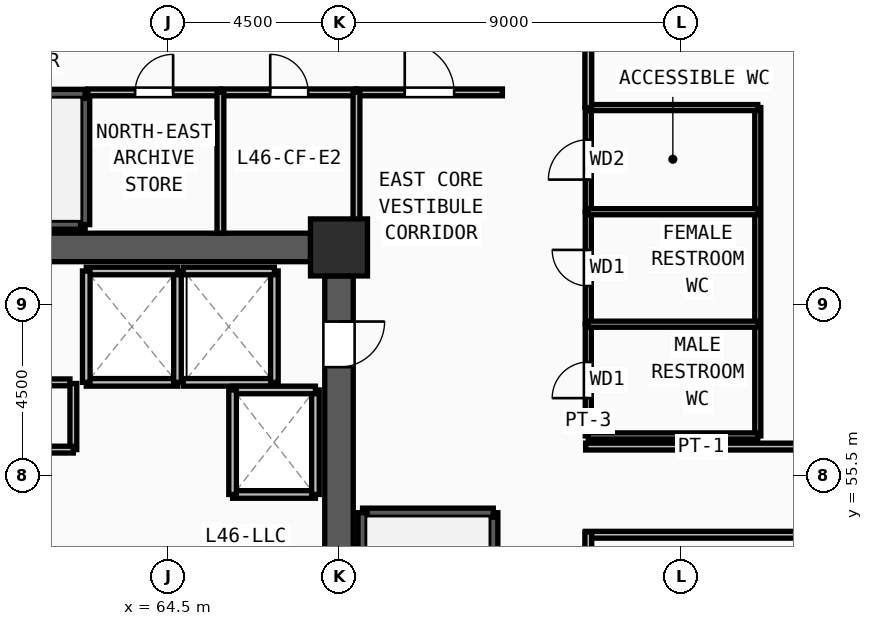
"""IFC4 building model, lengths in metres.
Left out: names, types, materials, properties, quantities, classifications, styles, units other than length and angle.
Written with IfcOpenShell. Run it as: python <this file> out.ifc"""

import sys

from ifc_helpers import new_model, si_unit, direction, frame, frame_2d, origin, origin_2d, place, context, subcontext, project, spatial, rectangle, extrude, source, transform, mapped, element, fill, save


model = new_model("IFC4")
c1 = context("Model", 3, precision=1e-05, world=origin(), true_north=direction((0.0, 1.0)))
c2 = subcontext(c1, "Body", "Model", "MODEL_VIEW")
j1 = project(units=[si_unit("LENGTHUNIT", "METRE"), si_unit("PLANEANGLEUNIT", "RADIAN")], contexts=[c1])
p1 = place(None, origin())
s1 = spatial("IfcSite", under=j1, at=p1, CompositionType="ELEMENT")
p2 = place(p1, origin())
s2 = spatial("IfcBuilding", under=s1, at=p2, CompositionType="ELEMENT")
p3 = place(p2, frame((0.0, 0.0, 177.75)))
s3 = spatial("IfcBuildingStorey", under=s2, at=p3, CompositionType="ELEMENT", Elevation=177.75)
m1 = source(origin(), c2, "Body", "SweptSolid", [
    extrude(rectangle(XDim=1.5, YDim=1.5, at=origin_2d()), origin(), (0.0, 0.0, 1.0), 3.75),
])
p4 = place(p3, frame((69.0, 61.5, 0.0), z_axis=(0.0, 0.0, 1.0), x_axis=(1.0, 0.0, 0.0)))
e1 = element("IfcColumn", 1, at=p4, inside=s3, PredefinedType="COLUMN", context=c2, shape_type="MappedRepresentation", body=[
    mapped(m1, transform((0.0, 0.0, 0.0), x_axis=(1.0, 0.0, 0.0), y_axis=(0.0, 1.0, 0.0), z_axis=(0.0, 0.0, 1.0), scale=1.0)),
])
p5 = place(p3, frame((60.75, 61.5, 0.0), z_axis=(0.0, 0.0, 1.0), x_axis=(1.0, 0.0, 0.0)))
e2 = element("IfcWall", 2, at=p5, inside=s3, PredefinedType="SHEAR", context=c2, shape_type="SweptSolid", body=[
    extrude(rectangle(XDim=7.5, YDim=0.75, at=frame_2d((3.75, 0.0))), origin(), (0.0, 0.0, 1.0), 3.57),
])
p6 = place(p3, frame((69.0, 60.75, 0.0), z_axis=(0.0, 0.0, 1.0), x_axis=(0.0, -1.0, 0.0)))
e3 = element("IfcWall", 3, at=p6, inside=s3, PredefinedType="SHEAR", context=c2, shape_type="SweptSolid", body=[
    extrude(rectangle(XDim=13.5, YDim=0.75, at=frame_2d((6.75, 0.0))), origin(), (0.0, 0.0, 1.0), 3.57),
])
m2 = source(origin(), c2, "Body", "SweptSolid", [
    extrude(rectangle(XDim=1.2, YDim=2.2, at=frame_2d((0.6, 1.1))), frame((0.0, 0.385, 0.0), z_axis=(0.0, -1.0, 0.0), x_axis=(1.0, 0.0, 0.0)), (0.0, 0.0, 1.0), 0.77),
])
p7 = place(p6, frame((1.2, 0.0, 0.0)))
e4 = element("IfcOpeningElement", 4, at=p7, cuts=e3, PredefinedType="OPENING", context=c2, shape_type="MappedRepresentation", body=[
    mapped(m2, transform((0.0, 0.0, 0.0), x_axis=(1.0, 0.0, 0.0), y_axis=(0.0, 1.0, 0.0), z_axis=(0.0, 0.0, 1.0), scale=1.0)),
])
p8 = place(p3, frame((73.06, 46.7, 0.0), z_axis=(0.0, 0.0, 1.0), x_axis=(0.0, 1.0, 0.0)))
e5 = element("IfcWall", 5, at=p8, inside=s3, PredefinedType="SOLIDWALL", context=c2, shape_type="SweptSolid", body=[
    extrude(rectangle(XDim=7.82, YDim=0.24, at=frame_2d((3.91, 0.0))), origin(), (0.0, 0.0, 1.0), 3.57),
])
m3 = source(origin(), c2, "Body", "SweptSolid", [
    extrude(rectangle(XDim=1.2, YDim=2.2, at=frame_2d((0.6, 1.1))), frame((0.0, 0.13, 0.0), z_axis=(0.0, -1.0, 0.0), x_axis=(1.0, 0.0, 0.0)), (0.0, 0.0, 1.0), 0.26),
])
p9 = place(p8, frame((0.32, 0.0, 0.0)))
e6 = element("IfcOpeningElement", 6, at=p9, cuts=e5, PredefinedType="OPENING", context=c2, shape_type="MappedRepresentation", body=[
    mapped(m3, transform((0.0, 0.0, 0.0), x_axis=(1.0, 0.0, 0.0), y_axis=(0.0, 1.0, 0.0), z_axis=(0.0, 0.0, 1.0), scale=1.0)),
])
p10 = place(p3, frame((73.06, 54.52, 0.0), z_axis=(0.0, 0.0, 1.0), x_axis=(-1.0, 0.0, 0.0)))
e7 = element("IfcWall", 7, at=p10, inside=s3, PredefinedType="SOLIDWALL", context=c2, shape_type="SweptSolid", body=[
    extrude(rectangle(XDim=3.44, YDim=0.24, at=frame_2d((1.72, 0.0))), origin(), (0.0, 0.0, 1.0), 3.57),
])
for number, where, z_axis, x_axis in (
    (8, (69.62, 54.52, 0.0), (0.0, 0.0, 1.0), (0.0, -1.0, 0.0)),
    (9, (54.5, 62.1, 0.0), (0.0, 0.0, 1.0), (1.0, 0.0, 0.0)),
):
    element("IfcWall", number, at=place(p3, frame(where, z_axis=z_axis, x_axis=x_axis)), inside=s3, PredefinedType="SOLIDWALL", context=c2, shape_type="SweptSolid", body=[
        extrude(rectangle(XDim=7.82, YDim=0.24, at=frame_2d((3.91, 0.0))), origin(), (0.0, 0.0, 1.0), 3.57),
    ])
p11 = place(p3, frame((62.32, 62.1, 0.0), z_axis=(0.0, 0.0, 1.0), x_axis=(0.0, 1.0, 0.0)))
e10 = element("IfcWall", 10, at=p11, inside=s3, PredefinedType="SOLIDWALL", context=c2, shape_type="SweptSolid", body=[
    extrude(rectangle(XDim=3.44, YDim=0.24, at=frame_2d((1.72, 0.0))), origin(), (0.0, 0.0, 1.0), 3.57),
])
p12 = place(p3, frame((62.32, 65.54, 0.0), z_axis=(0.0, 0.0, 1.0), x_axis=(-1.0, 0.0, 0.0)))
e11 = element("IfcWall", 11, at=p12, inside=s3, PredefinedType="SOLIDWALL", context=c2, shape_type="SweptSolid", body=[
    extrude(rectangle(XDim=7.82, YDim=0.24, at=frame_2d((3.91, 0.0))), origin(), (0.0, 0.0, 1.0), 3.57),
])
p13 = place(p12, frame((6.3, 0.0, 0.0)))
e12 = element("IfcOpeningElement", 12, at=p13, cuts=e11, PredefinedType="OPENING", context=c2, shape_type="MappedRepresentation", body=[
    mapped(m3, transform((0.0, 0.0, 0.0), x_axis=(1.0, 0.0, 0.0), y_axis=(0.0, 1.0, 0.0), z_axis=(0.0, 0.0, 1.0), scale=1.0)),
])
p14 = place(p3, frame((62.35, 57.95, 0.0), z_axis=(0.0, 0.0, 1.0), x_axis=(1.0, 0.0, 0.0)))
e13 = element("IfcWall", 13, at=p14, inside=s3, PredefinedType="SOLIDWALL", context=c2, shape_type="SweptSolid", body=[
    extrude(rectangle(XDim=2.4, YDim=0.2, at=frame_2d((1.2, 0.0))), origin(), (0.0, 0.0, 1.0), 3.57),
])
p15 = place(p3, frame((64.75, 57.95, 0.0), z_axis=(0.0, 0.0, 1.0), x_axis=(0.0, 1.0, 0.0)))
e14 = element("IfcWall", 14, at=p15, inside=s3, PredefinedType="SOLIDWALL", context=c2, shape_type="SweptSolid", body=[
    extrude(rectangle(XDim=2.93, YDim=0.2, at=frame_2d((1.465, 0.0))), origin(), (0.0, 0.0, 1.0), 3.57),
])
p16 = place(p3, frame((64.75, 60.88, 0.0), z_axis=(0.0, 0.0, 1.0), x_axis=(-1.0, 0.0, 0.0)))
e15 = element("IfcWall", 15, at=p16, inside=s3, PredefinedType="SOLIDWALL", context=c2, shape_type="SweptSolid", body=[
    extrude(rectangle(XDim=2.4, YDim=0.2, at=frame_2d((1.2, 0.0))), origin(), (0.0, 0.0, 1.0), 3.57),
])
p17 = place(p3, frame((62.35, 60.88, 0.0), z_axis=(0.0, 0.0, 1.0), x_axis=(0.0, -1.0, 0.0)))
e16 = element("IfcWall", 16, at=p17, inside=s3, PredefinedType="SOLIDWALL", context=c2, shape_type="SweptSolid", body=[
    extrude(rectangle(XDim=2.93, YDim=0.2, at=frame_2d((1.465, 0.0))), origin(), (0.0, 0.0, 1.0), 3.57),
])
p18 = place(p3, frame((64.9, 57.95, 0.0), z_axis=(0.0, 0.0, 1.0), x_axis=(1.0, 0.0, 0.0)))
e17 = element("IfcWall", 17, at=p18, inside=s3, PredefinedType="SOLIDWALL", context=c2, shape_type="SweptSolid", body=[
    extrude(rectangle(XDim=2.4, YDim=0.2, at=frame_2d((1.2, 0.0))), origin(), (0.0, 0.0, 1.0), 3.57),
])
p19 = place(p3, frame((67.3, 57.95, 0.0), z_axis=(0.0, 0.0, 1.0), x_axis=(0.0, 1.0, 0.0)))
e18 = element("IfcWall", 18, at=p19, inside=s3, PredefinedType="SOLIDWALL", context=c2, shape_type="SweptSolid", body=[
    extrude(rectangle(XDim=2.93, YDim=0.2, at=frame_2d((1.465, 0.0))), origin(), (0.0, 0.0, 1.0), 3.57),
])
p20 = place(p3, frame((67.3, 60.88, 0.0), z_axis=(0.0, 0.0, 1.0), x_axis=(-1.0, 0.0, 0.0)))
e19 = element("IfcWall", 19, at=p20, inside=s3, PredefinedType="SOLIDWALL", context=c2, shape_type="SweptSolid", body=[
    extrude(rectangle(XDim=2.4, YDim=0.2, at=frame_2d((1.2, 0.0))), origin(), (0.0, 0.0, 1.0), 3.57),
])
p21 = place(p3, frame((66.2, 55.0, 0.0), z_axis=(0.0, 0.0, 1.0), x_axis=(1.0, 0.0, 0.0)))
e20 = element("IfcWall", 20, at=p21, inside=s3, PredefinedType="SOLIDWALL", context=c2, shape_type="SweptSolid", body=[
    extrude(rectangle(XDim=2.18, YDim=0.2, at=frame_2d((1.09, 0.0))), origin(), (0.0, 0.0, 1.0), 3.57),
])
p22 = place(p3, frame((68.38, 55.0, 0.0), z_axis=(0.0, 0.0, 1.0), x_axis=(0.0, 1.0, 0.0)))
e21 = element("IfcWall", 21, at=p22, inside=s3, PredefinedType="SOLIDWALL", context=c2, shape_type="SweptSolid", body=[
    extrude(rectangle(XDim=2.75, YDim=0.2, at=frame_2d((1.375, 0.0))), origin(), (0.0, 0.0, 1.0), 3.57),
])
p23 = place(p3, frame((68.38, 57.75, 0.0), z_axis=(0.0, 0.0, 1.0), x_axis=(-1.0, 0.0, 0.0)))
e22 = element("IfcWall", 22, at=p23, inside=s3, PredefinedType="SOLIDWALL", context=c2, shape_type="SweptSolid", body=[
    extrude(rectangle(XDim=2.18, YDim=0.2, at=frame_2d((1.09, 0.0))), origin(), (0.0, 0.0, 1.0), 3.57),
])
p24 = place(p3, frame((66.2, 57.75, 0.0), z_axis=(0.0, 0.0, 1.0), x_axis=(0.0, -1.0, 0.0)))
e23 = element("IfcWall", 23, at=p24, inside=s3, PredefinedType="SOLIDWALL", context=c2, shape_type="SweptSolid", body=[
    extrude(rectangle(XDim=2.75, YDim=0.2, at=frame_2d((1.375, 0.0))), origin(), (0.0, 0.0, 1.0), 3.57),
])
p25 = place(p3, frame((59.81, 57.95, 0.0), z_axis=(0.0, 0.0, 1.0), x_axis=(1.0, 0.0, 0.0)))
e24 = element("IfcWall", 24, at=p25, inside=s3, PredefinedType="PARTITIONING", context=c2, shape_type="SweptSolid", body=[
    extrude(rectangle(XDim=2.11, YDim=0.18, at=frame_2d((1.055, 0.0))), origin(), (0.0, 0.0, 1.0), 3.57),
])
m4 = source(origin(), c2, "Body", "SweptSolid", [
    extrude(rectangle(XDim=0.85, YDim=2.1, at=frame_2d((0.425, 1.05))), frame((0.0, 0.1, 0.0), z_axis=(0.0, -1.0, 0.0), x_axis=(1.0, 0.0, 0.0)), (0.0, 0.0, 1.0), 0.2),
])
p26 = place(p25, frame((0.635, 0.0, 0.0)))
e25 = element("IfcOpeningElement", 25, at=p26, cuts=e24, PredefinedType="OPENING", context=c2, shape_type="MappedRepresentation", body=[
    mapped(m4, transform((0.0, 0.0, 0.0), x_axis=(1.0, 0.0, 0.0), y_axis=(0.0, 1.0, 0.0), z_axis=(0.0, 0.0, 1.0), scale=1.0)),
])
p27 = place(p3, frame((75.56, 56.54, 0.0), z_axis=(0.0, 0.0, 1.0), x_axis=(0.0, 1.0, 0.0)))
e26 = element("IfcWall", 26, at=p27, inside=s3, PredefinedType="PARTITIONING", context=c2, shape_type="SweptSolid", body=[
    extrude(rectangle(XDim=2.94, YDim=0.16, at=frame_2d((1.47, 0.0))), origin(), (0.0, 0.0, 1.0), 3.57),
])
m5 = source(origin(), c2, "Body", "SweptSolid", [
    extrude(rectangle(XDim=0.95, YDim=2.15, at=frame_2d((0.475, 1.075))), frame((0.0, 0.09, 0.0), z_axis=(0.0, -1.0, 0.0), x_axis=(1.0, 0.0, 0.0)), (0.0, 0.0, 1.0), 0.18),
])
p28 = place(p27, frame((0.995, 0.0, 0.0)))
e27 = element("IfcOpeningElement", 27, at=p28, cuts=e26, PredefinedType="OPENING", context=c2, shape_type="MappedRepresentation", body=[
    mapped(m5, transform((0.0, 0.0, 0.0), x_axis=(1.0, 0.0, 0.0), y_axis=(0.0, 1.0, 0.0), z_axis=(0.0, 0.0, 1.0), scale=1.0)),
])
p29 = place(p3, frame((75.56, 59.48, 0.0), z_axis=(0.0, 0.0, 1.0), x_axis=(0.0, 1.0, 0.0)))
e28 = element("IfcWall", 28, at=p29, inside=s3, PredefinedType="PARTITIONING", context=c2, shape_type="SweptSolid", body=[
    extrude(rectangle(XDim=2.96, YDim=0.16, at=frame_2d((1.48, 0.0))), origin(), (0.0, 0.0, 1.0), 3.57),
])
p30 = place(p29, frame((1.005, 0.0, 0.0)))
e29 = element("IfcOpeningElement", 29, at=p30, cuts=e28, PredefinedType="OPENING", context=c2, shape_type="MappedRepresentation", body=[
    mapped(m5, transform((0.0, 0.0, 0.0), x_axis=(1.0, 0.0, 0.0), y_axis=(0.0, 1.0, 0.0), z_axis=(0.0, 0.0, 1.0), scale=1.0)),
])
p31 = place(p3, frame((75.56, 62.44, 0.0), z_axis=(0.0, 0.0, 1.0), x_axis=(0.0, 1.0, 0.0)))
e30 = element("IfcWall", 30, at=p31, inside=s3, PredefinedType="PARTITIONING", context=c2, shape_type="SweptSolid", body=[
    extrude(rectangle(XDim=2.74, YDim=0.16, at=frame_2d((1.37, 0.0))), origin(), (0.0, 0.0, 1.0), 3.57),
])
m6 = source(origin(), c2, "Body", "SweptSolid", [
    extrude(rectangle(XDim=1.05, YDim=2.15, at=frame_2d((0.525, 1.075))), frame((0.0, 0.09, 0.0), z_axis=(0.0, -1.0, 0.0), x_axis=(1.0, 0.0, 0.0)), (0.0, 0.0, 1.0), 0.18),
])
p32 = place(p31, frame((0.845, 0.0, 0.0)))
e31 = element("IfcOpeningElement", 31, at=p32, cuts=e30, PredefinedType="OPENING", context=c2, shape_type="MappedRepresentation", body=[
    mapped(m6, transform((0.0, 0.0, 0.0), x_axis=(1.0, 0.0, 0.0), y_axis=(0.0, 1.0, 0.0), z_axis=(0.0, 0.0, 1.0), scale=1.0)),
])
p33 = place(p3, frame((62.39, 65.58, 0.0), z_axis=(0.0, 0.0, 1.0), x_axis=(1.0, 0.0, 0.0)))
e32 = element("IfcWall", 32, at=p33, inside=s3, PredefinedType="PARTITIONING", context=c2, shape_type="SweptSolid", body=[
    extrude(rectangle(XDim=3.49, YDim=0.18, at=frame_2d((1.745, 0.0))), origin(), (0.0, 0.0, 1.0), 3.57),
])
m7 = source(origin(), c2, "Body", "SweptSolid", [
    extrude(rectangle(XDim=1.0, YDim=2.2, at=frame_2d((0.5, 1.1))), frame((0.0, 0.1, 0.0), z_axis=(0.0, -1.0, 0.0), x_axis=(1.0, 0.0, 0.0)), (0.0, 0.0, 1.0), 0.2),
])
p34 = place(p33, frame((1.245, 0.0, 0.0)))
e33 = element("IfcOpeningElement", 33, at=p34, cuts=e32, PredefinedType="OPENING", context=c2, shape_type="MappedRepresentation", body=[
    mapped(m7, transform((0.0, 0.0, 0.0), x_axis=(1.0, 0.0, 0.0), y_axis=(0.0, 1.0, 0.0), z_axis=(0.0, 0.0, 1.0), scale=1.0)),
])
p35 = place(p3, frame((65.92, 65.58, 0.0), z_axis=(0.0, 0.0, 1.0), x_axis=(1.0, 0.0, 0.0)))
e34 = element("IfcWall", 34, at=p35, inside=s3, PredefinedType="PARTITIONING", context=c2, shape_type="SweptSolid", body=[
    extrude(rectangle(XDim=3.54, YDim=0.18, at=frame_2d((1.77, 0.0))), origin(), (0.0, 0.0, 1.0), 3.57),
])
p36 = place(p35, frame((1.27, 0.0, 0.0)))
e35 = element("IfcOpeningElement", 35, at=p36, cuts=e34, PredefinedType="OPENING", context=c2, shape_type="MappedRepresentation", body=[
    mapped(m7, transform((0.0, 0.0, 0.0), x_axis=(1.0, 0.0, 0.0), y_axis=(0.0, 1.0, 0.0), z_axis=(0.0, 0.0, 1.0), scale=1.0)),
])
p37 = place(p3, frame((69.46, 65.58, 0.0), z_axis=(0.0, 0.0, 1.0), x_axis=(1.0, 0.0, 0.0)))
e36 = element("IfcWall", 36, at=p37, inside=s3, PredefinedType="PARTITIONING", context=c2, shape_type="SweptSolid", body=[
    extrude(rectangle(XDim=3.84, YDim=0.18, at=frame_2d((1.92, 0.0))), origin(), (0.0, 0.0, 1.0), 3.57),
])
m8 = source(origin(), c2, "Body", "SweptSolid", [
    extrude(rectangle(XDim=1.3, YDim=2.2, at=frame_2d((0.65, 1.1))), frame((0.0, 0.1, 0.0), z_axis=(0.0, -1.0, 0.0), x_axis=(1.0, 0.0, 0.0)), (0.0, 0.0, 1.0), 0.2),
])
p38 = place(p37, frame((1.27, 0.0, 0.0)))
e37 = element("IfcOpeningElement", 37, at=p38, cuts=e36, PredefinedType="OPENING", context=c2, shape_type="MappedRepresentation", body=[
    mapped(m8, transform((0.0, 0.0, 0.0), x_axis=(1.0, 0.0, 0.0), y_axis=(0.0, 1.0, 0.0), z_axis=(0.0, 0.0, 1.0), scale=1.0)),
])
p39 = place(p3, frame((75.49, 56.26, 0.0), z_axis=(0.0, 0.0, 1.0), x_axis=(1.0, 0.0, 0.0)))
e38 = element("IfcWall", 38, at=p39, inside=s3, PredefinedType="PARTITIONING", context=c2, shape_type="SweptSolid", body=[
    extrude(rectangle(XDim=14.15, YDim=0.18, at=frame_2d((7.075, 0.0))), origin(), (0.0, 0.0, 1.0), 3.57),
])
m9 = source(origin(), c2, "Body", "SweptSolid", [
    extrude(rectangle(XDim=1.5, YDim=2.2, at=frame_2d((0.75, 1.1))), frame((0.0, 0.1, 0.0), z_axis=(0.0, -1.0, 0.0), x_axis=(1.0, 0.0, 0.0)), (0.0, 0.0, 1.0), 0.2),
])
p40 = place(p39, frame((6.325, 0.0, 0.0)))
e39 = element("IfcOpeningElement", 39, at=p40, cuts=e38, PredefinedType="OPENING", context=c2, shape_type="MappedRepresentation", body=[
    mapped(m9, transform((0.0, 0.0, 0.0), x_axis=(1.0, 0.0, 0.0), y_axis=(0.0, 1.0, 0.0), z_axis=(0.0, 0.0, 1.0), scale=1.0)),
])
p41 = place(p3, frame((88.517, 53.94, 0.0), z_axis=(0.0, 0.0, 1.0), x_axis=(-1.0, 0.0, 0.0)))
e40 = element("IfcWall", 40, at=p41, inside=s3, PredefinedType="PARTITIONING", context=c2, shape_type="SweptSolid", body=[
    extrude(rectangle(XDim=13.027, YDim=0.18, at=frame_2d((6.514, 0.0))), origin(), (0.0, 0.0, 1.0), 3.57),
])
p42 = place(p41, frame((6.014, 0.0, 0.0)))
e41 = element("IfcOpeningElement", 41, at=p42, cuts=e40, PredefinedType="OPENING", context=c2, shape_type="MappedRepresentation", body=[
    mapped(m7, transform((0.0, 0.0, 0.0), x_axis=(1.0, 0.0, 0.0), y_axis=(0.0, 1.0, 0.0), z_axis=(0.0, 0.0, 1.0), scale=1.0)),
])
p43 = place(p3, frame((62.01, 56.18, 0.0), z_axis=(0.0, 0.0, 1.0), x_axis=(0.0, 1.0, 0.0)))
e42 = element("IfcWall", 42, at=p43, inside=s3, PredefinedType="PARTITIONING", context=c2, shape_type="SweptSolid", body=[
    extrude(rectangle(XDim=1.74, YDim=0.18, at=frame_2d((0.87, 0.0))), origin(), (0.0, 0.0, 1.0), 3.57),
])
p44 = place(p3, frame((59.72, 56.18, 0.0), z_axis=(0.0, 0.0, 1.0), x_axis=(1.0, 0.0, 0.0)))
e43 = element("IfcWall", 43, at=p44, inside=s3, PredefinedType="PARTITIONING", context=c2, shape_type="SweptSolid", body=[
    extrude(rectangle(XDim=2.29, YDim=0.18, at=frame_2d((1.145, 0.0))), origin(), (0.0, 0.0, 1.0), 3.57),
])
p45 = place(p3, frame((80.02, 56.54, 0.0), z_axis=(0.0, 0.0, 1.0), x_axis=(0.0, 1.0, 0.0)))
e44 = element("IfcWall", 44, at=p45, inside=s3, PredefinedType="PARTITIONING", context=c2, shape_type="SweptSolid", body=[
    extrude(rectangle(XDim=8.64, YDim=0.16, at=frame_2d((4.32, 0.0))), origin(), (0.0, 0.0, 1.0), 3.57),
])
for number, where, z_axis, x_axis in (
    (45, (75.56, 56.54, 0.0), (0.0, 0.0, 1.0), (1.0, 0.0, 0.0)),
    (46, (75.56, 59.48, 0.0), (0.0, 0.0, 1.0), (1.0, 0.0, 0.0)),
    (47, (75.56, 62.44, 0.0), (0.0, 0.0, 1.0), (1.0, 0.0, 0.0)),
    (48, (75.56, 65.18, 0.0), (0.0, 0.0, 1.0), (1.0, 0.0, 0.0)),
):
    element("IfcWall", number, at=place(p3, frame(where, z_axis=z_axis, x_axis=x_axis)), inside=s3, PredefinedType="PARTITIONING", context=c2, shape_type="SweptSolid", body=[
        extrude(rectangle(XDim=4.46, YDim=0.16, at=frame_2d((2.23, 0.0))), origin(), (0.0, 0.0, 1.0), 3.57),
    ])
p46 = place(p3, frame((65.88, 61.875, 0.0), z_axis=(0.0, 0.0, 1.0), x_axis=(0.0, 1.0, 0.0)))
e49 = element("IfcWall", 49, at=p46, inside=s3, PredefinedType="PARTITIONING", context=c2, shape_type="SweptSolid", body=[
    extrude(rectangle(XDim=3.705, YDim=0.18, at=frame_2d((1.853, 0.0))), origin(), (0.0, 0.0, 1.0), 3.57),
])
p47 = place(p3, frame((69.46, 61.95, 0.0), z_axis=(0.0, 0.0, 1.0), x_axis=(0.0, 1.0, 0.0)))
e50 = element("IfcWall", 50, at=p47, inside=s3, PredefinedType="PARTITIONING", context=c2, shape_type="SweptSolid", body=[
    extrude(rectangle(XDim=3.63, YDim=0.18, at=frame_2d((1.815, 0.0))), origin(), (0.0, 0.0, 1.0), 3.57),
])
p48 = place(p3, frame((75.56, 67.215, 0.0), z_axis=(0.0, 0.0, 1.0), x_axis=(0.0, -1.0, 0.0)))
e51 = element("IfcWall", 51, at=p48, inside=s3, PredefinedType="PARTITIONING", context=c2, shape_type="SweptSolid", body=[
    extrude(rectangle(XDim=2.035, YDim=0.18, at=frame_2d((1.018, 0.0))), origin(), (0.0, 0.0, 1.0), 3.57),
])
p49 = place(p3, frame((75.56, 54.01, 0.0), z_axis=(0.0, 0.0, 1.0), x_axis=(0.0, -1.0, 0.0)))
e52 = element("IfcWall", 52, at=p49, inside=s3, PredefinedType="PARTITIONING", context=c2, shape_type="SweptSolid", body=[
    extrude(rectangle(XDim=1.795, YDim=0.18, at=frame_2d((0.897, 0.0))), origin(), (0.0, 0.0, 1.0), 3.57),
])
m10 = source(origin(), c2, "Body", "SweptSolid", [
    extrude(rectangle(XDim=1.2, YDim=2.2, at=frame_2d((0.6, 1.1))), frame((0.0, 0.025, 0.0), z_axis=(0.0, -1.0, 0.0), x_axis=(1.0, 0.0, 0.0)), (0.0, 0.0, 1.0), 0.05),
])
p50 = place(p7, origin())
e53 = element("IfcDoor", 53, at=p50, inside=s3, OperationType="SINGLE_SWING_LEFT", PredefinedType="DOOR", context=c2, shape_type="MappedRepresentation", body=[
    mapped(m10, transform((0.0, 0.0, 0.0), x_axis=(1.0, 0.0, 0.0), y_axis=(0.0, 1.0, 0.0), z_axis=(0.0, 0.0, 1.0), scale=1.0)),
])
fill(e4, e53)
m11 = source(origin(), c2, "Body", "SweptSolid", [
    extrude(rectangle(XDim=0.95, YDim=2.15, at=frame_2d((0.475, 1.075))), frame((0.0, 0.025, 0.0), z_axis=(0.0, -1.0, 0.0), x_axis=(1.0, 0.0, 0.0)), (0.0, 0.0, 1.0), 0.05),
])
p51 = place(p28, origin())
e54 = element("IfcDoor", 54, at=p51, inside=s3, OperationType="SINGLE_SWING_LEFT", PredefinedType="DOOR", context=c2, shape_type="MappedRepresentation", body=[
    mapped(m11, transform((0.0, 0.0, 0.0), x_axis=(1.0, 0.0, 0.0), y_axis=(0.0, 1.0, 0.0), z_axis=(0.0, 0.0, 1.0), scale=1.0)),
])
fill(e27, e54)
p52 = place(p30, origin())
e55 = element("IfcDoor", 55, at=p52, inside=s3, OperationType="SINGLE_SWING_RIGHT", PredefinedType="DOOR", context=c2, shape_type="MappedRepresentation", body=[
    mapped(m11, transform((0.0, 0.0, 0.0), x_axis=(1.0, 0.0, 0.0), y_axis=(0.0, 1.0, 0.0), z_axis=(0.0, 0.0, 1.0), scale=1.0)),
])
fill(e29, e55)
m12 = source(origin(), c2, "Body", "SweptSolid", [
    extrude(rectangle(XDim=1.05, YDim=2.15, at=frame_2d((0.525, 1.075))), frame((0.0, 0.025, 0.0), z_axis=(0.0, -1.0, 0.0), x_axis=(1.0, 0.0, 0.0)), (0.0, 0.0, 1.0), 0.05),
])
p53 = place(p32, origin())
e56 = element("IfcDoor", 56, at=p53, inside=s3, OperationType="SINGLE_SWING_LEFT", PredefinedType="DOOR", context=c2, shape_type="MappedRepresentation", body=[
    mapped(m12, transform((0.0, 0.0, 0.0), x_axis=(1.0, 0.0, 0.0), y_axis=(0.0, 1.0, 0.0), z_axis=(0.0, 0.0, 1.0), scale=1.0)),
])
fill(e31, e56)
m13 = source(origin(), c2, "Body", "SweptSolid", [
    extrude(rectangle(XDim=1.0, YDim=2.2, at=frame_2d((0.5, 1.1))), frame((0.0, 0.025, 0.0), z_axis=(0.0, -1.0, 0.0), x_axis=(1.0, 0.0, 0.0)), (0.0, 0.0, 1.0), 0.05),
])
p54 = place(p34, origin())
e57 = element("IfcDoor", 57, at=p54, inside=s3, OperationType="SINGLE_SWING_RIGHT", PredefinedType="DOOR", context=c2, shape_type="MappedRepresentation", body=[
    mapped(m13, transform((0.0, 0.0, 0.0), x_axis=(1.0, 0.0, 0.0), y_axis=(0.0, 1.0, 0.0), z_axis=(0.0, 0.0, 1.0), scale=1.0)),
])
fill(e33, e57)
p55 = place(p36, origin())
e58 = element("IfcDoor", 58, at=p55, inside=s3, OperationType="SINGLE_SWING_LEFT", PredefinedType="DOOR", context=c2, shape_type="MappedRepresentation", body=[
    mapped(m13, transform((0.0, 0.0, 0.0), x_axis=(1.0, 0.0, 0.0), y_axis=(0.0, 1.0, 0.0), z_axis=(0.0, 0.0, 1.0), scale=1.0)),
])
fill(e35, e58)
m14 = source(origin(), c2, "Body", "SweptSolid", [
    extrude(rectangle(XDim=1.3, YDim=2.2, at=frame_2d((0.65, 1.1))), frame((0.0, 0.025, 0.0), z_axis=(0.0, -1.0, 0.0), x_axis=(1.0, 0.0, 0.0)), (0.0, 0.0, 1.0), 0.05),
])
p56 = place(p38, origin())
e59 = element("IfcDoor", 59, at=p56, inside=s3, OperationType="SINGLE_SWING_LEFT", PredefinedType="DOOR", context=c2, shape_type="MappedRepresentation", body=[
    mapped(m14, transform((0.0, 0.0, 0.0), x_axis=(1.0, 0.0, 0.0), y_axis=(0.0, 1.0, 0.0), z_axis=(0.0, 0.0, 1.0), scale=1.0)),
])
fill(e37, e59)
save(model, sys.argv[1])
